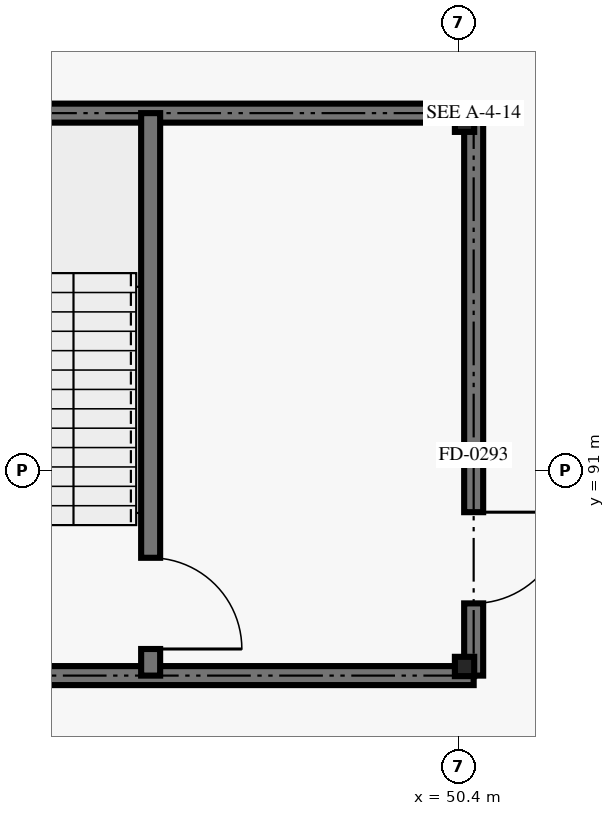
"""IFC4 building model, lengths in metres.
Left out: names, types, materials, properties, quantities, classifications, styles, units other than length and angle.
Written with IfcOpenShell. Run it as: python <this file> out.ifc"""

import sys

from ifc_helpers import new_model, si_unit, direction, frame, frame_2d, origin, origin_2d, place, context, subcontext, project, spatial, rectangle, i_section, extrude, element, fill, save


model = new_model("IFC4")
c1 = context("Model", 3, precision=1e-05, world=origin(), true_north=direction((0.0, 1.0)))
c2 = subcontext(c1, "Body", "Model", "MODEL_VIEW")
j1 = project(units=[si_unit("LENGTHUNIT", "METRE"), si_unit("PLANEANGLEUNIT", "RADIAN")], contexts=[c1])
p1 = place(None, origin())
s1 = spatial("IfcSite", under=j1, at=p1, CompositionType="ELEMENT")
p2 = place(p1, origin())
s2 = spatial("IfcBuilding", under=s1, at=p2, CompositionType="ELEMENT")
p3 = place(p2, frame((0.0, 0.0, 10.2)))
s3 = spatial("IfcBuildingStorey", under=s2, at=p3, CompositionType="ELEMENT", Elevation=10.2)
for number, where, z_axis, x_axis in (
    (1, (50.48, 88.42, 0.0), (0.0, 0.0, 1.0), (1.0, 0.0, 0.0)),
    (2, (50.48, 95.58, 0.0), (0.0, 0.0, 1.0), (1.0, 0.0, 0.0)),
):
    element("IfcColumn", number, at=place(p3, frame(where, z_axis=z_axis, x_axis=x_axis)), inside=s3, PredefinedType="COLUMN", context=c2, shape_type="SweptSolid", body=[
        extrude(i_section(OverallWidth=0.254, OverallDepth=0.254, WebThickness=0.009, FlangeThickness=0.014, FilletRadius=0.013, at=origin_2d()), origin(), (0.0, 0.0, 1.0), 4.8),
    ])
p4 = place(p3, frame((42.2, 110.2, 0.0), z_axis=(0.0, 0.0, 1.0), x_axis=(0.78200261515, -0.623275147827, 0.0)))
e3 = element("IfcWall", 3, at=p4, inside=s3, PredefinedType="SOLIDWALL", context=c2, shape_type="SweptSolid", body=[
    extrude(rectangle(XDim=25.831, YDim=0.4, at=frame_2d((12.916, 0.0))), origin(), (0.0, 0.0, 1.0), 3.62),
])
for number, where, z_axis, x_axis in (
    (4, (41.4, 95.7, 0.0), (0.0, 0.0, 1.0), (1.0, 0.0, 0.0)),
    (5, (50.6, 88.3, 0.0), (0.0, 0.0, 1.0), (-1.0, 0.0, 0.0)),
):
    element("IfcWall", number, at=place(p3, frame(where, z_axis=z_axis, x_axis=x_axis)), inside=s3, PredefinedType="SHEAR", context=c2, shape_type="SweptSolid", body=[
        extrude(rectangle(XDim=9.2, YDim=0.25, at=frame_2d((4.6, 0.0))), origin(), (0.0, 0.0, 1.0), 4.56),
    ])
p5 = place(p3, frame((50.6, 95.7, 0.0), z_axis=(0.0, 0.0, 1.0), x_axis=(0.0, -1.0, 0.0)))
e6 = element("IfcWall", 6, at=p5, inside=s3, PredefinedType="SHEAR", context=c2, shape_type="SweptSolid", body=[
    extrude(rectangle(XDim=7.4, YDim=0.25, at=frame_2d((3.7, 0.0))), origin(), (0.0, 0.0, 1.0), 4.56),
])
p6 = place(p5, frame((5.25, 0.0, 0.0)))
e7 = element("IfcOpeningElement", 7, at=p6, cuts=e6, PredefinedType="OPENING", context=c2, shape_type="SweptSolid", body=[
    extrude(rectangle(XDim=1.2, YDim=2.2, at=frame_2d((0.6, 1.1))), frame((0.0, 0.135, 0.0), z_axis=(0.0, -1.0, 0.0), x_axis=(1.0, 0.0, 0.0)), (0.0, 0.0, 1.0), 0.27),
])
p7 = place(p3, frame((46.35, 95.7, 0.0), z_axis=(0.0, 0.0, 1.0), x_axis=(0.0, -1.0, 0.0)))
e8 = element("IfcWall", 8, at=p7, inside=s3, PredefinedType="SHEAR", context=c2, shape_type="SweptSolid", body=[
    extrude(rectangle(XDim=7.4, YDim=0.25, at=frame_2d((3.7, 0.0))), origin(), (0.0, 0.0, 1.0), 4.56),
])
p8 = place(p7, frame((5.85, 0.0, 0.0)))
e9 = element("IfcOpeningElement", 9, at=p8, cuts=e8, PredefinedType="OPENING", context=c2, shape_type="SweptSolid", body=[
    extrude(rectangle(XDim=1.2, YDim=2.2, at=frame_2d((0.6, 1.1))), frame((0.0, 0.135, 0.0), z_axis=(0.0, -1.0, 0.0), x_axis=(1.0, 0.0, 0.0)), (0.0, 0.0, 1.0), 0.27),
])
p9 = place(p6, origin())
e10 = element("IfcDoor", 10, at=p9, inside=s3, OperationType="SINGLE_SWING_LEFT", PredefinedType="DOOR", context=c2, shape_type="SweptSolid", body=[
    extrude(rectangle(XDim=1.2, YDim=2.2, at=frame_2d((0.6, 1.1))), frame((0.0, 0.025, 0.0), z_axis=(0.0, -1.0, 0.0), x_axis=(1.0, 0.0, 0.0)), (0.0, 0.0, 1.0), 0.05),
])
fill(e7, e10)
p10 = place(p8, origin())
e11 = element("IfcDoor", 11, at=p10, inside=s3, OperationType="SINGLE_SWING_RIGHT", PredefinedType="DOOR", context=c2, shape_type="SweptSolid", body=[
    extrude(rectangle(XDim=1.2, YDim=2.2, at=frame_2d((0.6, 1.1))), frame((0.0, 0.025, 0.0), z_axis=(0.0, -1.0, 0.0), x_axis=(1.0, 0.0, 0.0)), (0.0, 0.0, 1.0), 0.05),
])
fill(e9, e11)
save(model, sys.argv[1])
